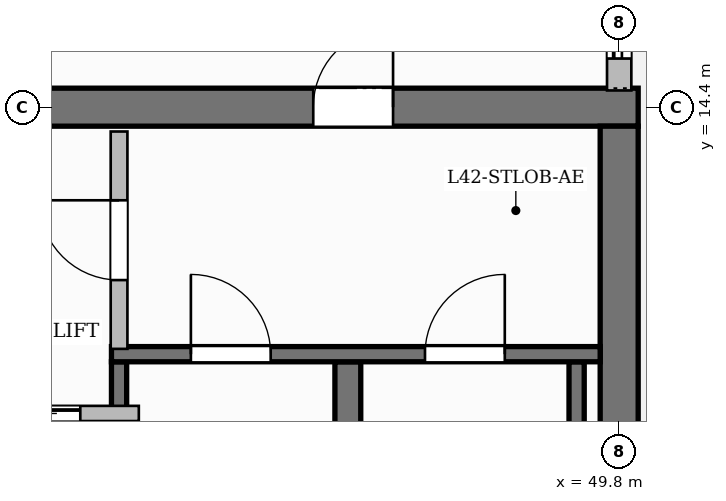
"""IFC4 building model, lengths in metres.
Left out: names, types, materials, properties, quantities, classifications, styles, units other than length and angle.
Written with IfcOpenShell. Run it as: python <this file> out.ifc"""

import sys

from ifc_helpers import new_model, si_unit, direction, frame, frame_2d, origin, place, context, subcontext, project, spatial, rectangle, extrude, source, transform, mapped, element, fill, save


model = new_model("IFC4")
c1 = context("Model", 3, precision=1e-05, world=origin(), true_north=direction((0.0, 1.0)))
c2 = subcontext(c1, "Body", "Model", "MODEL_VIEW")
j1 = project(units=[si_unit("LENGTHUNIT", "METRE"), si_unit("PLANEANGLEUNIT", "RADIAN")], contexts=[c1])
p1 = place(None, origin())
s1 = spatial("IfcSite", under=j1, at=p1, CompositionType="ELEMENT")
p2 = place(p1, origin())
s2 = spatial("IfcBuilding", under=s1, at=p2, CompositionType="ELEMENT")
p3 = place(p2, frame((0.0, 0.0, 169.55)))
s3 = spatial("IfcBuildingStorey", under=s2, at=p3, CompositionType="ELEMENT", Elevation=169.55)
p4 = place(p3, frame((34.55, 14.4, 0.0), z_axis=(0.0, 0.0, 1.0), x_axis=(1.0, 0.0, 0.0)))
e1 = element("IfcWall", 1, at=p4, inside=s3, PredefinedType="SHEAR", context=c2, shape_type="SweptSolid", body=[
    extrude(rectangle(XDim=15.5, YDim=0.5, at=frame_2d((7.75, 0.0))), origin(), (0.0, 0.0, 1.0), 3.85),
])
p5 = place(p4, frame((5.38, 0.0, 0.0)))
e2 = element("IfcOpeningElement", 2, at=p5, cuts=e1, PredefinedType="OPENING", context=c2, shape_type="SweptSolid", body=[
    extrude(rectangle(XDim=1.5, YDim=2.2, at=frame_2d((0.75, 1.1))), frame((0.0, 0.26, 0.0), z_axis=(0.0, -1.0, 0.0), x_axis=(1.0, 0.0, 0.0)), (0.0, 0.0, 1.0), 0.52),
])
p6 = place(p4, frame((1.595, 0.0, 0.0)))
e3 = element("IfcOpeningElement", 3, at=p6, cuts=e1, PredefinedType="OPENING", context=c2, shape_type="SweptSolid", body=[
    extrude(rectangle(XDim=1.05, YDim=2.15, at=frame_2d((0.525, 1.075))), frame((0.0, 0.26, 0.0), z_axis=(0.0, -1.0, 0.0), x_axis=(1.0, 0.0, 0.0)), (0.0, 0.0, 1.0), 0.52),
])
p7 = place(p4, frame((11.225, 0.0, 0.0)))
e4 = element("IfcOpeningElement", 4, at=p7, cuts=e1, PredefinedType="OPENING", context=c2, shape_type="SweptSolid", body=[
    extrude(rectangle(XDim=1.05, YDim=2.15, at=frame_2d((0.525, 1.075))), frame((0.0, 0.26, 0.0), z_axis=(0.0, -1.0, 0.0), x_axis=(1.0, 0.0, 0.0)), (0.0, 0.0, 1.0), 0.52),
])
p8 = place(p3, frame((49.8, 3.85, 0.0), z_axis=(0.0, 0.0, 1.0), x_axis=(0.0, 1.0, 0.0)))
e5 = element("IfcWall", 5, at=p8, inside=s3, PredefinedType="SHEAR", context=c2, shape_type="SweptSolid", body=[
    extrude(rectangle(XDim=10.3, YDim=0.5, at=frame_2d((5.15, 0.0))), origin(), (0.0, 0.0, 1.0), 3.85),
])
p9 = place(p3, frame((43.22, 4.1, 0.0), z_axis=(0.0, 0.0, 1.0), x_axis=(0.0, 1.0, 0.0)))
e6 = element("IfcWall", 6, at=p9, inside=s3, PredefinedType="SHEAR", context=c2, shape_type="SweptSolid", body=[
    extrude(rectangle(XDim=6.95, YDim=0.2, at=frame_2d((3.475, 0.0))), origin(), (0.0, 0.0, 1.0), 3.85),
])
p10 = place(p3, frame((46.23, 4.1, 0.0), z_axis=(0.0, 0.0, 1.0), x_axis=(0.0, 1.0, 0.0)))
e7 = element("IfcWall", 7, at=p10, inside=s3, PredefinedType="SHEAR", context=c2, shape_type="SweptSolid", body=[
    extrude(rectangle(XDim=6.95, YDim=0.34, at=frame_2d((3.475, 0.0))), origin(), (0.0, 0.0, 1.0), 3.85),
])
p11 = place(p3, frame((49.24, 4.1, 0.0), z_axis=(0.0, 0.0, 1.0), x_axis=(0.0, 1.0, 0.0)))
e8 = element("IfcWall", 8, at=p11, inside=s3, PredefinedType="SHEAR", context=c2, shape_type="SweptSolid", body=[
    extrude(rectangle(XDim=6.95, YDim=0.2, at=frame_2d((3.475, 0.0))), origin(), (0.0, 0.0, 1.0), 3.85),
])
p12 = place(p3, frame((43.12, 11.15, 0.0), z_axis=(0.0, 0.0, 1.0), x_axis=(1.0, 0.0, 0.0)))
e9 = element("IfcWall", 9, at=p12, inside=s3, PredefinedType="SHEAR", context=c2, shape_type="SweptSolid", body=[
    extrude(rectangle(XDim=6.43, YDim=0.2, at=frame_2d((3.215, 0.0))), origin(), (0.0, 0.0, 1.0), 3.85),
])
p13 = place(p12, frame((1.045, 0.0, 0.0)))
e10 = element("IfcOpeningElement", 10, at=p13, cuts=e9, PredefinedType="OPENING", context=c2, shape_type="SweptSolid", body=[
    extrude(rectangle(XDim=1.05, YDim=2.2, at=frame_2d((0.525, 1.1))), frame((0.0, 0.11, 0.0), z_axis=(0.0, -1.0, 0.0), x_axis=(1.0, 0.0, 0.0)), (0.0, 0.0, 1.0), 0.22),
])
p14 = place(p12, frame((4.125, 0.0, 0.0)))
e11 = element("IfcOpeningElement", 11, at=p14, cuts=e9, PredefinedType="OPENING", context=c2, shape_type="SweptSolid", body=[
    extrude(rectangle(XDim=1.05, YDim=2.2, at=frame_2d((0.525, 1.1))), frame((0.0, 0.11, 0.0), z_axis=(0.0, -1.0, 0.0), x_axis=(1.0, 0.0, 0.0)), (0.0, 0.0, 1.0), 0.22),
])
p15 = place(p3, frame((43.22, 11.22, 0.0), z_axis=(0.0, 0.0, 1.0), x_axis=(0.0, 1.0, 0.0)))
e12 = element("IfcWall", 12, at=p15, inside=s3, PredefinedType="PARTITIONING", context=c2, shape_type="SweptSolid", body=[
    extrude(rectangle(XDim=2.86, YDim=0.22, at=frame_2d((1.43, 0.0))), origin(), (0.0, 0.0, 1.0), 3.6),
])
p16 = place(p15, frame((0.905, 0.0, 0.0)))
e13 = element("IfcOpeningElement", 13, at=p16, cuts=e12, PredefinedType="OPENING", context=c2, shape_type="SweptSolid", body=[
    extrude(rectangle(XDim=1.05, YDim=2.15, at=frame_2d((0.525, 1.075))), frame((0.0, 0.12, 0.0), z_axis=(0.0, -1.0, 0.0), x_axis=(1.0, 0.0, 0.0)), (0.0, 0.0, 1.0), 0.24),
])
p17 = place(p3, frame((40.84, 10.37, 0.0), z_axis=(0.0, 0.0, 1.0), x_axis=(1.0, 0.0, 0.0)))
e14 = element("IfcWall", 14, at=p17, inside=s3, PredefinedType="PARTITIONING", context=c2, shape_type="SweptSolid", body=[
    extrude(rectangle(XDim=2.64, YDim=0.2, at=frame_2d((1.32, 0.0))), origin(), (0.0, 0.0, 1.0), 3.6),
])
p18 = place(p17, frame((0.77, 0.0, 0.0)))
e15 = element("IfcOpeningElement", 15, at=p18, cuts=e14, PredefinedType="OPENING", context=c2, shape_type="SweptSolid", body=[
    extrude(rectangle(XDim=1.1, YDim=2.2, at=frame_2d((0.55, 1.1))), frame((0.0, 0.11, 0.0), z_axis=(0.0, -1.0, 0.0), x_axis=(1.0, 0.0, 0.0)), (0.0, 0.0, 1.0), 0.22),
])
p19 = place(p3, frame((49.8, 14.62, 0.0), z_axis=(0.0, 0.0, 1.0), x_axis=(0.0, 1.0, 0.0)))
e16 = element("IfcWall", 16, at=p19, inside=s3, PredefinedType="SOLIDWALL", context=c2, shape_type="SweptSolid", body=[
    extrude(rectangle(XDim=6.93, YDim=0.32, at=frame_2d((3.465, 0.0))), origin(), (0.0, 0.0, 1.0), 3.085),
])
p20 = place(p19, frame((0.42, 0.0, 0.0)))
e17 = element("IfcOpeningElement", 17, at=p20, cuts=e16, PredefinedType="OPENING", context=c2, shape_type="SweptSolid", body=[
    extrude(rectangle(XDim=1.2, YDim=2.2, at=frame_2d((0.6, 1.1))), frame((0.0, 0.17, 0.0), z_axis=(0.0, -1.0, 0.0), x_axis=(1.0, 0.0, 0.0)), (0.0, 0.0, 1.0), 0.34),
])
p21 = place(p19, frame((3.659, 0.0, 0.8)))
e18 = element("IfcOpeningElement", 18, at=p21, cuts=e16, PredefinedType="OPENING", context=c2, shape_type="SweptSolid", body=[
    extrude(rectangle(XDim=1.8, YDim=1.85, at=frame_2d((0.9, 0.925))), frame((0.0, 0.17, 0.0), z_axis=(0.0, -1.0, 0.0), x_axis=(1.0, 0.0, 0.0)), (0.0, 0.0, 1.0), 0.34),
])
m1 = source(origin(), c2, "Body", "SweptSolid", [
    extrude(rectangle(XDim=1.05, YDim=2.2, at=frame_2d((0.525, 1.1))), frame((0.0, 0.025, 0.0), z_axis=(0.0, -1.0, 0.0), x_axis=(1.0, 0.0, 0.0)), (0.0, 0.0, 1.0), 0.05),
])
p22 = place(p13, origin())
e19 = element("IfcDoor", 19, at=p22, inside=s3, OperationType="SINGLE_SWING_LEFT", PredefinedType="DOOR", context=c2, shape_type="MappedRepresentation", body=[
    mapped(m1, transform((0.0, 0.0, 0.0), scale=1.0)),
])
fill(e10, e19)
p23 = place(p14, origin())
e20 = element("IfcDoor", 20, at=p23, inside=s3, OperationType="SINGLE_SWING_RIGHT", PredefinedType="DOOR", context=c2, shape_type="MappedRepresentation", body=[
    mapped(m1, transform((0.0, 0.0, 0.0), scale=1.0)),
])
fill(e11, e20)
m2 = source(origin(), c2, "Body", "SweptSolid", [
    extrude(rectangle(XDim=1.05, YDim=2.15, at=frame_2d((0.525, 1.075))), frame((0.0, 0.025, 0.0), z_axis=(0.0, -1.0, 0.0), x_axis=(1.0, 0.0, 0.0)), (0.0, 0.0, 1.0), 0.05),
])
p24 = place(p16, origin())
e21 = element("IfcDoor", 21, at=p24, inside=s3, OperationType="SINGLE_SWING_RIGHT", PredefinedType="DOOR", context=c2, shape_type="MappedRepresentation", body=[
    mapped(m2, transform((0.0, 0.0, 0.0), scale=1.0)),
])
fill(e13, e21)
p25 = place(p7, origin())
e22 = element("IfcDoor", 22, at=p25, inside=s3, OperationType="SINGLE_SWING_RIGHT", PredefinedType="DOOR", context=c2, shape_type="MappedRepresentation", body=[
    mapped(m2, transform((0.0, 0.0, 0.0), scale=1.0)),
])
fill(e4, e22)
m3 = source(origin(), c2, "Body", "SweptSolid", [
    extrude(rectangle(XDim=1.1, YDim=2.2, at=frame_2d((0.55, 1.1))), frame((0.0, 0.025, 0.0), z_axis=(0.0, -1.0, 0.0), x_axis=(1.0, 0.0, 0.0)), (0.0, 0.0, 1.0), 0.05),
])
p26 = place(p18, origin())
e23 = element("IfcDoor", 23, at=p26, inside=s3, OperationType="SLIDING_TO_LEFT", PredefinedType="DOOR", context=c2, shape_type="MappedRepresentation", body=[
    mapped(m3, transform((0.0, 0.0, 0.0), scale=1.0)),
])
fill(e15, e23)
m4 = source(origin(), c2, "Body", "SweptSolid", [
    extrude(rectangle(XDim=1.2, YDim=2.2, at=frame_2d((0.6, 1.1))), frame((0.0, 0.025, 0.0), z_axis=(0.0, -1.0, 0.0), x_axis=(1.0, 0.0, 0.0)), (0.0, 0.0, 1.0), 0.05),
])
p27 = place(p20, origin())
e24 = element("IfcDoor", 24, at=p27, inside=s3, OperationType="SLIDING_TO_LEFT", PredefinedType="DOOR", context=c2, shape_type="MappedRepresentation", body=[
    mapped(m4, transform((0.0, 0.0, 0.0), scale=1.0)),
])
fill(e17, e24)
save(model, sys.argv[1])
